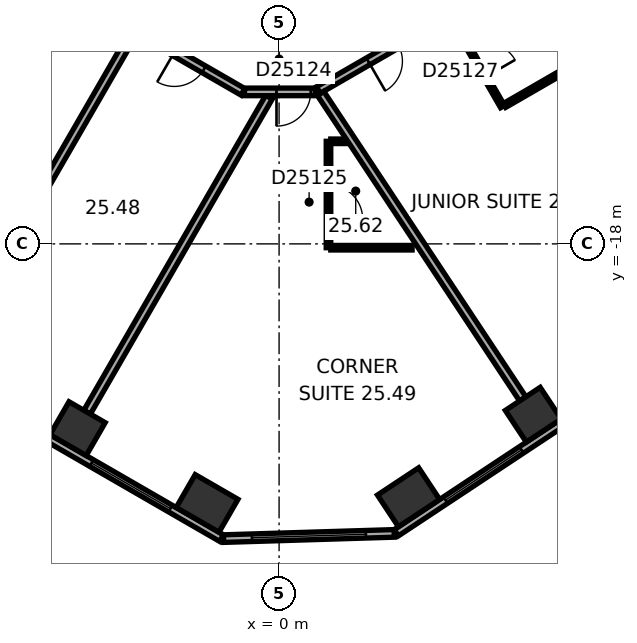
"""IFC4 building model, lengths in metres.
Left out: names, types, materials, properties, quantities, classifications, styles, units other than length and angle.
Written with IfcOpenShell. Run it as: python <this file> out.ifc"""

import sys

from ifc_helpers import new_model, si_unit, direction, frame, frame_2d, origin, origin_2d, place, context, subcontext, project, spatial, rectangle, extrude, element, fill, save


model = new_model("IFC4")
c1 = context("Model", 3, precision=1e-05, world=origin(), true_north=direction((0.0, 1.0)))
c2 = subcontext(c1, "Body", "Model", "MODEL_VIEW")
j1 = project(units=[si_unit("LENGTHUNIT", "METRE"), si_unit("PLANEANGLEUNIT", "RADIAN")], contexts=[c1])
p1 = place(None, origin())
s1 = spatial("IfcSite", under=j1, at=p1, CompositionType="ELEMENT")
p2 = place(p1, origin())
s2 = spatial("IfcBuilding", under=s1, at=p2, CompositionType="ELEMENT")
p3 = place(p2, frame((0.0, 0.0, 106.7)))
s3 = spatial("IfcBuildingStorey", under=s2, at=p3, CompositionType="ELEMENT", Elevation=106.7)
p4 = place(p3, frame((-5.302, -22.862, 0.0), z_axis=(0.0, 0.0, 1.0), x_axis=(0.866025403784, -0.5, 0.0)))
e1 = element("IfcColumn", 1, at=p4, inside=s3, PredefinedType="COLUMN", context=c2, shape_type="SweptSolid", body=[
    extrude(rectangle(XDim=1.1, YDim=1.0, at=origin_2d()), origin(), (0.0, 0.0, 1.0), 3.3),
])
for number, where, z_axis, x_axis in (
    (2, (-1.895, -24.829, 0.0), (0.0, 0.0, 1.0), (0.866, -0.5, 0.0)),
    (3, (3.407, -24.667, 0.0), (0.0, 0.0, 1.0), (0.834, 0.552, 0.0)),
):
    element("IfcColumn", number, at=place(p3, frame(where, z_axis=z_axis, x_axis=x_axis)), inside=s3, PredefinedType="COLUMN", context=c2, shape_type="SweptSolid", body=[
        extrude(rectangle(XDim=1.3, YDim=1.0, at=origin_2d()), origin(), (0.0, 0.0, 1.0), 3.3),
    ])
p5 = place(p3, frame((6.688, -22.496, 0.0), z_axis=(0.0, 0.0, 1.0), x_axis=(0.833885822067, 0.551936985312, 0.0)))
e4 = element("IfcColumn", 4, at=p5, inside=s3, PredefinedType="COLUMN", context=c2, shape_type="SweptSolid", body=[
    extrude(rectangle(XDim=1.1, YDim=1.0, at=origin_2d()), origin(), (0.0, 0.0, 1.0), 3.3),
])
p6 = place(p3, frame((-19.914, -15.119, 0.0), z_axis=(0.0, 0.0, 1.0), x_axis=(0.866025418898, -0.499999973822, 0.0)))
e5 = element("IfcWall", 5, at=p6, inside=s3, PredefinedType="STANDARD", context=c2, shape_type="SweptSolid", body=[
    extrude(rectangle(XDim=21.246, YDim=0.2, at=frame_2d((10.623, 0.0))), origin(), (0.0, 0.0, 1.0), 3.3),
])
p7 = place(p6, frame((1.555, 0.0, 0.8)))
e6 = element("IfcOpeningElement", 6, at=p7, cuts=e5, PredefinedType="OPENING", context=c2, shape_type="SweptSolid", body=[
    extrude(rectangle(XDim=2.4, YDim=1.7, at=frame_2d((1.2, 0.85))), frame((0.0, 0.11, 0.0), z_axis=(0.0, -1.0, 0.0), x_axis=(1.0, 0.0, 0.0)), (0.0, 0.0, 1.0), 0.22),
])
p8 = place(p6, frame((5.489, 0.0, 0.8)))
e7 = element("IfcOpeningElement", 7, at=p8, cuts=e5, PredefinedType="OPENING", context=c2, shape_type="SweptSolid", body=[
    extrude(rectangle(XDim=2.4, YDim=1.7, at=frame_2d((1.2, 0.85))), frame((0.0, 0.11, 0.0), z_axis=(0.0, -1.0, 0.0), x_axis=(1.0, 0.0, 0.0)), (0.0, 0.0, 1.0), 0.22),
])
p9 = place(p6, frame((9.424, 0.0, 0.8)))
e8 = element("IfcOpeningElement", 8, at=p9, cuts=e5, PredefinedType="OPENING", context=c2, shape_type="SweptSolid", body=[
    extrude(rectangle(XDim=2.4, YDim=1.7, at=frame_2d((1.2, 0.85))), frame((0.0, 0.11, 0.0), z_axis=(0.0, -1.0, 0.0), x_axis=(1.0, 0.0, 0.0)), (0.0, 0.0, 1.0), 0.22),
])
p10 = place(p6, frame((13.358, 0.0, 0.8)))
e9 = element("IfcOpeningElement", 9, at=p10, cuts=e5, PredefinedType="OPENING", context=c2, shape_type="SweptSolid", body=[
    extrude(rectangle(XDim=2.4, YDim=1.7, at=frame_2d((1.2, 0.85))), frame((0.0, 0.11, 0.0), z_axis=(0.0, -1.0, 0.0), x_axis=(1.0, 0.0, 0.0)), (0.0, 0.0, 1.0), 0.22),
])
p11 = place(p6, frame((17.293, 0.0, 0.8)))
e10 = element("IfcOpeningElement", 10, at=p11, cuts=e5, PredefinedType="OPENING", context=c2, shape_type="SweptSolid", body=[
    extrude(rectangle(XDim=2.4, YDim=1.7, at=frame_2d((1.2, 0.85))), frame((0.0, 0.11, 0.0), z_axis=(0.0, -1.0, 0.0), x_axis=(1.0, 0.0, 0.0)), (0.0, 0.0, 1.0), 0.22),
])
p12 = place(p3, frame((-1.461, -25.755, 0.0), z_axis=(0.0, 0.0, 1.0), x_axis=(0.999533823446, 0.030530898895, 0.0)))
e11 = element("IfcWall", 11, at=p12, inside=s3, PredefinedType="STANDARD", context=c2, shape_type="SweptSolid", body=[
    extrude(rectangle(XDim=4.494, YDim=0.2, at=frame_2d((2.247, 0.0))), origin(), (0.0, 0.0, 1.0), 3.3),
])
p13 = place(p12, frame((0.747, 0.0, 0.8)))
e12 = element("IfcOpeningElement", 12, at=p13, cuts=e11, PredefinedType="OPENING", context=c2, shape_type="SweptSolid", body=[
    extrude(rectangle(XDim=3.0, YDim=1.7, at=frame_2d((1.5, 0.85))), frame((0.0, 0.11, 0.0), z_axis=(0.0, -1.0, 0.0), x_axis=(1.0, 0.0, 0.0)), (0.0, 0.0, 1.0), 0.22),
])
p14 = place(p3, frame((3.083, -25.601, 0.0), z_axis=(0.0, 0.0, 1.0), x_axis=(0.833884295743, 0.551939291329, 0.0)))
e13 = element("IfcWall", 13, at=p14, inside=s3, PredefinedType="STANDARD", context=c2, shape_type="SweptSolid", body=[
    extrude(rectangle(XDim=21.246, YDim=0.2, at=frame_2d((10.623, 0.0))), origin(), (0.0, 0.0, 1.0), 3.3),
])
p15 = place(p14, frame((1.553, 0.0, 0.8)))
e14 = element("IfcOpeningElement", 14, at=p15, cuts=e13, PredefinedType="OPENING", context=c2, shape_type="SweptSolid", body=[
    extrude(rectangle(XDim=2.4, YDim=1.7, at=frame_2d((1.2, 0.85))), frame((0.0, 0.11, 0.0), z_axis=(0.0, -1.0, 0.0), x_axis=(1.0, 0.0, 0.0)), (0.0, 0.0, 1.0), 0.22),
])
p16 = place(p14, frame((5.488, 0.0, 0.8)))
e15 = element("IfcOpeningElement", 15, at=p16, cuts=e13, PredefinedType="OPENING", context=c2, shape_type="SweptSolid", body=[
    extrude(rectangle(XDim=2.4, YDim=1.7, at=frame_2d((1.2, 0.85))), frame((0.0, 0.11, 0.0), z_axis=(0.0, -1.0, 0.0), x_axis=(1.0, 0.0, 0.0)), (0.0, 0.0, 1.0), 0.22),
])
p17 = place(p14, frame((9.422, 0.0, 0.8)))
e16 = element("IfcOpeningElement", 16, at=p17, cuts=e13, PredefinedType="OPENING", context=c2, shape_type="SweptSolid", body=[
    extrude(rectangle(XDim=2.4, YDim=1.7, at=frame_2d((1.2, 0.85))), frame((0.0, 0.11, 0.0), z_axis=(0.0, -1.0, 0.0), x_axis=(1.0, 0.0, 0.0)), (0.0, 0.0, 1.0), 0.22),
])
p18 = place(p14, frame((13.357, 0.0, 0.8)))
e17 = element("IfcOpeningElement", 17, at=p18, cuts=e13, PredefinedType="OPENING", context=c2, shape_type="SweptSolid", body=[
    extrude(rectangle(XDim=2.4, YDim=1.7, at=frame_2d((1.2, 0.85))), frame((0.0, 0.11, 0.0), z_axis=(0.0, -1.0, 0.0), x_axis=(1.0, 0.0, 0.0)), (0.0, 0.0, 1.0), 0.22),
])
p19 = place(p14, frame((17.291, 0.0, 0.8)))
e18 = element("IfcOpeningElement", 18, at=p19, cuts=e13, PredefinedType="OPENING", context=c2, shape_type="SweptSolid", body=[
    extrude(rectangle(XDim=2.4, YDim=1.7, at=frame_2d((1.2, 0.85))), frame((0.0, 0.11, 0.0), z_axis=(0.0, -1.0, 0.0), x_axis=(1.0, 0.0, 0.0)), (0.0, 0.0, 1.0), 0.22),
])
p20 = place(p3, frame((-11.615, -7.843, 0.0), z_axis=(0.0, 0.0, 1.0), x_axis=(0.866026466995, -0.499998158461, 0.0)))
e19 = element("IfcWall", 19, at=p20, inside=s3, PredefinedType="PARTITIONING", context=c2, shape_type="SweptSolid", body=[
    extrude(rectangle(XDim=12.315, YDim=0.2, at=frame_2d((6.158, 0.0))), origin(), (0.0, 0.0, 1.0), 3.05),
])
p21 = place(p20, frame((5.983, 0.0, 0.0)))
e20 = element("IfcOpeningElement", 20, at=p21, cuts=e19, PredefinedType="OPENING", context=c2, shape_type="SweptSolid", body=[
    extrude(rectangle(XDim=0.9, YDim=2.1, at=frame_2d((0.45, 1.05))), frame((0.0, 0.11, 0.0), z_axis=(0.0, -1.0, 0.0), x_axis=(1.0, 0.0, 0.0)), (0.0, 0.0, 1.0), 0.22),
])
p22 = place(p20, frame((10.229, 0.0, 0.0)))
e21 = element("IfcOpeningElement", 21, at=p22, cuts=e19, PredefinedType="OPENING", context=c2, shape_type="SweptSolid", body=[
    extrude(rectangle(XDim=0.9, YDim=2.1, at=frame_2d((0.45, 1.05))), frame((0.0, 0.11, 0.0), z_axis=(0.0, -1.0, 0.0), x_axis=(1.0, 0.0, 0.0)), (0.0, 0.0, 1.0), 0.22),
])
p23 = place(p3, frame((-8.46, -20.461, 0.0), z_axis=(0.0, 0.0, 1.0), x_axis=(0.499999662836, 0.866025598446, 0.0)))
e22 = element("IfcWall", 22, at=p23, inside=s3, PredefinedType="PARTITIONING", context=c2, shape_type="SweptSolid", body=[
    extrude(rectangle(XDim=9.25, YDim=0.2, at=frame_2d((4.625, 0.0))), origin(), (0.0, 0.0, 1.0), 3.05),
])
p24 = place(p3, frame((-5.052, -22.429, 0.0), z_axis=(0.0, 0.0, 1.0), x_axis=(0.500004329283, 0.866022904257, 0.0)))
e23 = element("IfcWall", 23, at=p24, inside=s3, PredefinedType="PARTITIONING", context=c2, shape_type="SweptSolid", body=[
    extrude(rectangle(XDim=9.572, YDim=0.2, at=frame_2d((4.786, 0.0))), origin(), (0.0, 0.0, 1.0), 3.05),
])
p25 = place(p3, frame((-0.91, -14.001, 0.0), z_axis=(0.0, 0.0, 1.0), x_axis=(1.0, 0.0, 0.0)))
e24 = element("IfcWall", 24, at=p25, inside=s3, PredefinedType="PARTITIONING", context=c2, shape_type="SweptSolid", body=[
    extrude(rectangle(XDim=1.86, YDim=0.2, at=frame_2d((0.93, 0.0))), origin(), (0.0, 0.0, 1.0), 3.05),
])
p26 = place(p25, frame((0.842, 0.0, 0.0)))
e25 = element("IfcOpeningElement", 25, at=p26, cuts=e24, PredefinedType="OPENING", context=c2, shape_type="SweptSolid", body=[
    extrude(rectangle(XDim=0.9, YDim=2.1, at=frame_2d((0.45, 1.05))), frame((0.0, 0.11, 0.0), z_axis=(0.0, -1.0, 0.0), x_axis=(1.0, 0.0, 0.0)), (0.0, 0.0, 1.0), 0.22),
])
p27 = place(p3, frame((1.033, -13.953, 0.0), z_axis=(0.0, 0.0, 1.0), x_axis=(0.866017531406, 0.500013635111, 0.0)))
e26 = element("IfcWall", 26, at=p27, inside=s3, PredefinedType="PARTITIONING", context=c2, shape_type="SweptSolid", body=[
    extrude(rectangle(XDim=6.58, YDim=0.2, at=frame_2d((3.29, 0.0))), origin(), (0.0, 0.0, 1.0), 3.05),
])
p28 = place(p27, frame((1.515, 0.0, 0.0)))
e27 = element("IfcOpeningElement", 27, at=p28, cuts=e26, PredefinedType="OPENING", context=c2, shape_type="SweptSolid", body=[
    extrude(rectangle(XDim=0.9, YDim=2.1, at=frame_2d((0.45, 1.05))), frame((0.0, 0.11, 0.0), z_axis=(0.0, -1.0, 0.0), x_axis=(1.0, 0.0, 0.0)), (0.0, 0.0, 1.0), 0.22),
])
p29 = place(p3, frame((1.3, -18.101, 0.0), z_axis=(0.0, 0.0, 1.0), x_axis=(0.0, 1.0, 0.0)))
e28 = element("IfcWall", 28, at=p29, inside=s3, PredefinedType="PARTITIONING", context=c2, shape_type="SweptSolid", body=[
    extrude(rectangle(XDim=2.8, YDim=0.12, at=frame_2d((1.4, 0.0))), origin(), (0.0, 0.0, 1.0), 3.05),
])
p30 = place(p29, frame((0.75, 0.0, 0.0)))
e29 = element("IfcOpeningElement", 29, at=p30, cuts=e28, PredefinedType="OPENING", context=c2, shape_type="SweptSolid", body=[
    extrude(rectangle(XDim=0.9, YDim=2.1, at=frame_2d((0.45, 1.05))), frame((0.0, 0.07, 0.0), z_axis=(0.0, -1.0, 0.0), x_axis=(1.0, 0.0, 0.0)), (0.0, 0.0, 1.0), 0.14),
])
p31 = place(p3, frame((1.36, -15.301, 0.0), z_axis=(0.0, 0.0, 1.0), x_axis=(1.0, 0.0, 0.0)))
e30 = element("IfcWall", 30, at=p31, inside=s3, PredefinedType="PARTITIONING", context=c2, shape_type="SweptSolid", body=[
    extrude(rectangle(XDim=0.416, YDim=0.12, at=frame_2d((0.208, 0.0))), origin(), (0.0, 0.0, 1.0), 3.05),
])
p32 = place(p3, frame((3.5, -18.101, 0.0), z_axis=(0.0, 0.0, 1.0), x_axis=(-1.0, 0.0, 0.0)))
e31 = element("IfcWall", 31, at=p32, inside=s3, PredefinedType="PARTITIONING", context=c2, shape_type="SweptSolid", body=[
    extrude(rectangle(XDim=2.14, YDim=0.12, at=frame_2d((1.07, 0.0))), origin(), (0.0, 0.0, 1.0), 3.05),
])
p33 = place(p3, frame((5.881, -14.387, 0.0), z_axis=(0.0, 0.0, 1.0), x_axis=(-0.500048589285, 0.86599734893, 0.0)))
e32 = element("IfcWall", 32, at=p33, inside=s3, PredefinedType="PARTITIONING", context=c2, shape_type="SweptSolid", body=[
    extrude(rectangle(XDim=2.7, YDim=0.12, at=frame_2d((1.35, 0.0))), origin(), (0.0, 0.0, 1.0), 3.05),
])
p34 = place(p33, frame((0.9, 0.0, 0.0)))
e33 = element("IfcOpeningElement", 33, at=p34, cuts=e32, PredefinedType="OPENING", context=c2, shape_type="SweptSolid", body=[
    extrude(rectangle(XDim=0.9, YDim=2.1, at=frame_2d((0.45, 1.05))), frame((0.0, 0.07, 0.0), z_axis=(0.0, -1.0, 0.0), x_axis=(1.0, 0.0, 0.0)), (0.0, 0.0, 1.0), 0.14),
])
p35 = place(p3, frame((6.412, -22.079, 0.0), z_axis=(0.0, 0.0, 1.0), x_axis=(-0.551919507115, 0.83389739037, 0.0)))
e34 = element("IfcWall", 34, at=p35, inside=s3, PredefinedType="PARTITIONING", context=c2, shape_type="SweptSolid", body=[
    extrude(rectangle(XDim=9.635, YDim=0.2, at=frame_2d((4.817, 0.0))), origin(), (0.0, 0.0, 1.0), 3.05),
])
p36 = place(p3, frame((8.946, -12.617, 0.0), z_axis=(0.0, 0.0, 1.0), x_axis=(-0.865989304205, -0.500062521093, 0.0)))
e35 = element("IfcWall", 35, at=p36, inside=s3, PredefinedType="PARTITIONING", context=c2, shape_type="SweptSolid", body=[
    extrude(rectangle(XDim=3.48, YDim=0.12, at=frame_2d((1.74, 0.0))), origin(), (0.0, 0.0, 1.0), 3.05),
])
p37 = place(p11, origin())
e36 = element("IfcWindow", 36, at=p37, inside=s3, PartitioningType="SINGLE_PANEL", PredefinedType="WINDOW", context=c2, shape_type="SweptSolid", body=[
    extrude(rectangle(XDim=2.4, YDim=1.7, at=frame_2d((1.2, 0.85))), frame((0.0, 0.03, 0.0), z_axis=(0.0, -1.0, 0.0), x_axis=(1.0, 0.0, 0.0)), (0.0, 0.0, 1.0), 0.06),
])
fill(e10, e36)
p38 = place(p13, origin())
e37 = element("IfcWindow", 37, at=p38, inside=s3, PartitioningType="SINGLE_PANEL", PredefinedType="WINDOW", context=c2, shape_type="SweptSolid", body=[
    extrude(rectangle(XDim=3.0, YDim=1.7, at=frame_2d((1.5, 0.85))), frame((0.0, 0.03, 0.0), z_axis=(0.0, -1.0, 0.0), x_axis=(1.0, 0.0, 0.0)), (0.0, 0.0, 1.0), 0.06),
])
fill(e12, e37)
p39 = place(p15, origin())
e38 = element("IfcWindow", 38, at=p39, inside=s3, PartitioningType="SINGLE_PANEL", PredefinedType="WINDOW", context=c2, shape_type="SweptSolid", body=[
    extrude(rectangle(XDim=2.4, YDim=1.7, at=frame_2d((1.2, 0.85))), frame((0.0, 0.03, 0.0), z_axis=(0.0, -1.0, 0.0), x_axis=(1.0, 0.0, 0.0)), (0.0, 0.0, 1.0), 0.06),
])
fill(e14, e38)
p40 = place(p22, origin())
e39 = element("IfcDoor", 39, at=p40, inside=s3, OperationType="SINGLE_SWING_LEFT", PredefinedType="DOOR", context=c2, shape_type="SweptSolid", body=[
    extrude(rectangle(XDim=0.9, YDim=2.1, at=frame_2d((0.45, 1.05))), frame((0.0, 0.025, 0.0), z_axis=(0.0, -1.0, 0.0), x_axis=(1.0, 0.0, 0.0)), (0.0, 0.0, 1.0), 0.05),
])
fill(e21, e39)
p41 = place(p26, origin())
e40 = element("IfcDoor", 40, at=p41, inside=s3, OperationType="SINGLE_SWING_LEFT", PredefinedType="DOOR", context=c2, shape_type="SweptSolid", body=[
    extrude(rectangle(XDim=0.9, YDim=2.1, at=frame_2d((0.45, 1.05))), frame((0.0, 0.025, 0.0), z_axis=(0.0, -1.0, 0.0), x_axis=(1.0, 0.0, 0.0)), (0.0, 0.0, 1.0), 0.05),
])
fill(e25, e40)
p42 = place(p30, origin())
e41 = element("IfcDoor", 41, at=p42, inside=s3, OperationType="SINGLE_SWING_LEFT", PredefinedType="DOOR", context=c2, shape_type="SweptSolid", body=[
    extrude(rectangle(XDim=0.9, YDim=2.1, at=frame_2d((0.45, 1.05))), frame((0.0, 0.025, 0.0), z_axis=(0.0, -1.0, 0.0), x_axis=(1.0, 0.0, 0.0)), (0.0, 0.0, 1.0), 0.05),
])
fill(e29, e41)
p43 = place(p28, origin())
e42 = element("IfcDoor", 42, at=p43, inside=s3, OperationType="SINGLE_SWING_LEFT", PredefinedType="DOOR", context=c2, shape_type="SweptSolid", body=[
    extrude(rectangle(XDim=0.9, YDim=2.1, at=frame_2d((0.45, 1.05))), frame((0.0, 0.025, 0.0), z_axis=(0.0, -1.0, 0.0), x_axis=(1.0, 0.0, 0.0)), (0.0, 0.0, 1.0), 0.05),
])
fill(e27, e42)
p44 = place(p34, origin())
e43 = element("IfcDoor", 43, at=p44, inside=s3, OperationType="SINGLE_SWING_LEFT", PredefinedType="DOOR", context=c2, shape_type="SweptSolid", body=[
    extrude(rectangle(XDim=0.9, YDim=2.1, at=frame_2d((0.45, 1.05))), frame((0.0, 0.025, 0.0), z_axis=(0.0, -1.0, 0.0), x_axis=(1.0, 0.0, 0.0)), (0.0, 0.0, 1.0), 0.05),
])
fill(e33, e43)
save(model, sys.argv[1])
